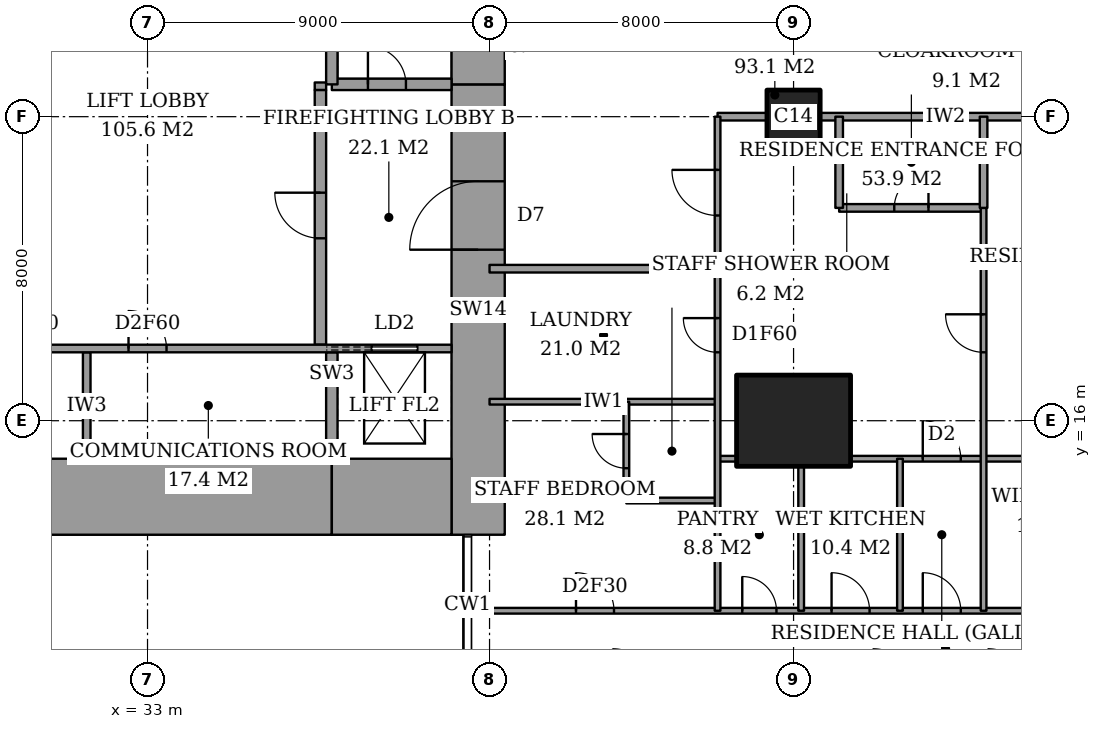
"""IFC4 building model, lengths in metres.
Left out: names, types, materials, properties, quantities, classifications, styles, units other than length and angle.
Written with IfcOpenShell. Run it as: python <this file> out.ifc"""

import sys

from ifc_helpers import new_model, si_unit, direction, frame, frame_2d, origin, origin_2d, place, context, subcontext, project, spatial, rectangle, extrude, element, fill, save


model = new_model("IFC4")
c1 = context("Model", 3, precision=1e-05, world=origin(), true_north=direction((0.0, 1.0)))
c2 = subcontext(c1, "Body", "Model", "MODEL_VIEW")
j1 = project(units=[si_unit("LENGTHUNIT", "METRE"), si_unit("PLANEANGLEUNIT", "RADIAN")], contexts=[c1])
p1 = place(None, origin())
s1 = spatial("IfcSite", under=j1, at=p1, CompositionType="ELEMENT")
p2 = place(p1, origin())
s2 = spatial("IfcBuilding", under=s1, at=p2, CompositionType="ELEMENT")
p3 = place(p2, frame((0.0, 0.0, 282.6)))
s3 = spatial("IfcBuildingStorey", under=s2, at=p3, CompositionType="ELEMENT", Elevation=282.6)
p4 = place(p3, frame((50.0, 16.0, 0.0), z_axis=(0.0, 0.0, 1.0), x_axis=(1.0, 0.0, 0.0)))
e1 = element("IfcColumn", 1, at=p4, inside=s3, PredefinedType="COLUMN", context=c2, shape_type="SweptSolid", body=[
    extrude(rectangle(XDim=3.0, YDim=2.4, at=origin_2d()), origin(), (0.0, 0.0, 1.0), 4.5),
])
p5 = place(p3, frame((50.0, 24.0, 0.0), z_axis=(0.0, 0.0, 1.0), x_axis=(1.0, 0.0, 0.0)))
e2 = element("IfcColumn", 2, at=p5, inside=s3, PredefinedType="COLUMN", context=c2, shape_type="SweptSolid", body=[
    extrude(rectangle(XDim=1.4, YDim=1.4, at=origin_2d()), origin(), (0.0, 0.0, 1.0), 4.5),
])
p6 = place(p3, frame((28.15, 14.0, 0.0), z_axis=(0.0, 0.0, 1.0), x_axis=(1.0, 0.0, 0.0)))
e3 = element("IfcWall", 3, at=p6, inside=s3, PredefinedType="SHEAR", context=c2, shape_type="SweptSolid", body=[
    extrude(rectangle(XDim=9.7, YDim=2.0, at=frame_2d((4.85, 0.0))), origin(), (0.0, 0.0, 1.0), 4.5),
])
p7 = place(p3, frame((37.85, 14.0, 0.0), z_axis=(0.0, 0.0, 1.0), x_axis=(1.0, 0.0, 0.0)))
e4 = element("IfcWall", 4, at=p7, inside=s3, PredefinedType="SHEAR", context=c2, shape_type="SweptSolid", body=[
    extrude(rectangle(XDim=3.15, YDim=2.0, at=frame_2d((1.575, 0.0))), origin(), (0.0, 0.0, 1.0), 4.5),
])
p8 = place(p3, frame((41.7, 13.0, 0.0), z_axis=(0.0, 0.0, 1.0), x_axis=(0.0, 1.0, 0.0)))
e5 = element("IfcWall", 5, at=p8, inside=s3, PredefinedType="SHEAR", context=c2, shape_type="SweptSolid", body=[
    extrude(rectangle(XDim=11.85, YDim=1.4, at=frame_2d((5.925, 0.0))), origin(), (0.0, 0.0, 1.0), 4.5),
])
p9 = place(p8, frame((7.5, 0.0, 0.0)))
e6 = element("IfcOpeningElement", 6, at=p9, cuts=e5, PredefinedType="OPENING", context=c2, shape_type="SweptSolid", body=[
    extrude(rectangle(XDim=1.8, YDim=2.4, at=frame_2d((0.9, 1.2))), frame((0.0, 0.71, 0.0), z_axis=(0.0, -1.0, 0.0), x_axis=(1.0, 0.0, 0.0)), (0.0, 0.0, 1.0), 1.42),
])
p10 = place(p3, frame((41.7, 24.85, 0.0), z_axis=(0.0, 0.0, 1.0), x_axis=(0.0, 1.0, 0.0)))
e7 = element("IfcWall", 7, at=p10, inside=s3, PredefinedType="SHEAR", context=c2, shape_type="SweptSolid", body=[
    extrude(rectangle(XDim=10.15, YDim=1.4, at=frame_2d((5.075, 0.0))), origin(), (0.0, 0.0, 1.0), 4.5),
])
p11 = place(p3, frame((37.85, 24.85, 0.0), z_axis=(0.0, 0.0, 1.0), x_axis=(0.0, 1.0, 0.0)))
e8 = element("IfcWall", 8, at=p11, inside=s3, PredefinedType="SHEAR", context=c2, shape_type="SweptSolid", body=[
    extrude(rectangle(XDim=8.15, YDim=0.3, at=frame_2d((4.075, 0.0))), origin(), (0.0, 0.0, 1.0), 4.5),
])
p12 = place(p3, frame((37.85, 24.85, 0.0), z_axis=(0.0, 0.0, 1.0), x_axis=(1.0, 0.0, 0.0)))
e9 = element("IfcWall", 9, at=p12, inside=s3, PredefinedType="SHEAR", context=c2, shape_type="SweptSolid", body=[
    extrude(rectangle(XDim=3.15, YDim=0.3, at=frame_2d((1.575, 0.0))), origin(), (0.0, 0.0, 1.0), 4.5),
])
p13 = place(p12, frame((0.95, 0.0, 0.0)))
e10 = element("IfcOpeningElement", 10, at=p13, cuts=e9, PredefinedType="OPENING", context=c2, shape_type="SweptSolid", body=[
    extrude(rectangle(XDim=1.0, YDim=2.1, at=frame_2d((0.5, 1.05))), frame((0.0, 0.16, 0.0), z_axis=(0.0, -1.0, 0.0), x_axis=(1.0, 0.0, 0.0)), (0.0, 0.0, 1.0), 0.32),
])
p14 = place(p3, frame((37.55, 18.0, 0.0), z_axis=(0.0, 0.0, 1.0), x_axis=(0.0, 1.0, 0.0)))
e11 = element("IfcWall", 11, at=p14, inside=s3, PredefinedType="PARTITIONING", context=c2, shape_type="SweptSolid", body=[
    extrude(rectangle(XDim=6.7, YDim=0.3, at=frame_2d((3.35, 0.0))), origin(), (0.0, 0.0, 1.0), 4.5),
])
p15 = place(p14, frame((2.8, 0.0, 0.0)))
e12 = element("IfcOpeningElement", 12, at=p15, cuts=e11, PredefinedType="OPENING", context=c2, shape_type="SweptSolid", body=[
    extrude(rectangle(XDim=1.2, YDim=2.1, at=frame_2d((0.6, 1.05))), frame((0.0, 0.16, 0.0), z_axis=(0.0, -1.0, 0.0), x_axis=(1.0, 0.0, 0.0)), (0.0, 0.0, 1.0), 0.32),
])
p16 = place(p3, frame((41.439, 11.0, 0.0), z_axis=(0.0, 0.0, 1.0), x_axis=(1.0, 0.0, 0.0)))
e13 = element("IfcWall", 13, at=p16, inside=s3, PredefinedType="PARTITIONING", context=c2, shape_type="SweptSolid", body=[
    extrude(rectangle(XDim=25.011, YDim=0.15, at=frame_2d((12.505, 0.0))), origin(), (0.0, 0.0, 1.0), 4.25),
])
p17 = place(p16, frame((11.961, 0.0, 0.0)))
e14 = element("IfcOpeningElement", 14, at=p17, cuts=e13, PredefinedType="OPENING", context=c2, shape_type="SweptSolid", body=[
    extrude(rectangle(XDim=1.0, YDim=2.1, at=frame_2d((0.5, 1.05))), frame((0.0, 0.085, 0.0), z_axis=(0.0, -1.0, 0.0), x_axis=(1.0, 0.0, 0.0)), (0.0, 0.0, 1.0), 0.17),
])
p18 = place(p16, frame((20.924, 0.0, 0.0)))
e15 = element("IfcOpeningElement", 15, at=p18, cuts=e13, PredefinedType="OPENING", context=c2, shape_type="SweptSolid", body=[
    extrude(rectangle(XDim=1.0, YDim=2.1, at=frame_2d((0.5, 1.05))), frame((0.0, 0.085, 0.0), z_axis=(0.0, -1.0, 0.0), x_axis=(1.0, 0.0, 0.0)), (0.0, 0.0, 1.0), 0.17),
])
p19 = place(p16, frame((15.249, 0.0, 0.0)))
e16 = element("IfcOpeningElement", 16, at=p19, cuts=e13, PredefinedType="OPENING", context=c2, shape_type="SweptSolid", body=[
    extrude(rectangle(XDim=0.9, YDim=2.1, at=frame_2d((0.45, 1.05))), frame((0.0, 0.085, 0.0), z_axis=(0.0, -1.0, 0.0), x_axis=(1.0, 0.0, 0.0)), (0.0, 0.0, 1.0), 0.17),
])
p20 = place(p16, frame((9.561, 0.0, 0.0)))
e17 = element("IfcOpeningElement", 17, at=p20, cuts=e13, PredefinedType="OPENING", context=c2, shape_type="SweptSolid", body=[
    extrude(rectangle(XDim=1.0, YDim=2.1, at=frame_2d((0.5, 1.05))), frame((0.0, 0.085, 0.0), z_axis=(0.0, -1.0, 0.0), x_axis=(1.0, 0.0, 0.0)), (0.0, 0.0, 1.0), 0.17),
])
p21 = place(p16, frame((7.211, 0.0, 0.0)))
e18 = element("IfcOpeningElement", 18, at=p21, cuts=e13, PredefinedType="OPENING", context=c2, shape_type="SweptSolid", body=[
    extrude(rectangle(XDim=0.9, YDim=2.1, at=frame_2d((0.45, 1.05))), frame((0.0, 0.085, 0.0), z_axis=(0.0, -1.0, 0.0), x_axis=(1.0, 0.0, 0.0)), (0.0, 0.0, 1.0), 0.17),
])
p22 = place(p16, frame((2.836, 0.0, 0.0)))
e19 = element("IfcOpeningElement", 19, at=p22, cuts=e13, PredefinedType="OPENING", context=c2, shape_type="SweptSolid", body=[
    extrude(rectangle(XDim=1.0, YDim=2.1, at=frame_2d((0.5, 1.05))), frame((0.0, 0.085, 0.0), z_axis=(0.0, -1.0, 0.0), x_axis=(1.0, 0.0, 0.0)), (0.0, 0.0, 1.0), 0.17),
])
p23 = place(p3, frame((45.6, 13.9, 0.0), z_axis=(0.0, 0.0, 1.0), x_axis=(1.0, 0.0, 0.0)))
e20 = element("IfcWall", 20, at=p23, inside=s3, PredefinedType="PARTITIONING", context=c2, shape_type="SweptSolid", body=[
    extrude(rectangle(XDim=2.4, YDim=0.15, at=frame_2d((1.2, 0.0))), origin(), (0.0, 0.0, 1.0), 4.25),
])
p24 = place(p3, frame((48.0, 15.0, 0.0), z_axis=(0.0, 0.0, 1.0), x_axis=(1.0, 0.0, 0.0)))
e21 = element("IfcWall", 21, at=p24, inside=s3, PredefinedType="PARTITIONING", context=c2, shape_type="SweptSolid", body=[
    extrude(rectangle(XDim=0.5, YDim=0.15, at=frame_2d((0.25, 0.0))), origin(), (0.0, 0.0, 1.0), 4.25),
])
p25 = place(p3, frame((51.5, 15.0, 0.0), z_axis=(0.0, 0.0, 1.0), x_axis=(1.0, 0.0, 0.0)))
e22 = element("IfcWall", 22, at=p25, inside=s3, PredefinedType="PARTITIONING", context=c2, shape_type="SweptSolid", body=[
    extrude(rectangle(XDim=5.0, YDim=0.15, at=frame_2d((2.5, 0.0))), origin(), (0.0, 0.0, 1.0), 4.25),
])
p26 = place(p25, frame((1.9, 0.0, 0.0)))
e23 = element("IfcOpeningElement", 23, at=p26, cuts=e22, PredefinedType="OPENING", context=c2, shape_type="SweptSolid", body=[
    extrude(rectangle(XDim=1.0, YDim=2.1, at=frame_2d((0.5, 1.05))), frame((0.0, 0.085, 0.0), z_axis=(0.0, -1.0, 0.0), x_axis=(1.0, 0.0, 0.0)), (0.0, 0.0, 1.0), 0.17),
])
p27 = place(p3, frame((42.0, 16.5, 0.0), z_axis=(0.0, 0.0, 1.0), x_axis=(1.0, 0.0, 0.0)))
e24 = element("IfcWall", 24, at=p27, inside=s3, PredefinedType="PARTITIONING", context=c2, shape_type="SweptSolid", body=[
    extrude(rectangle(XDim=6.0, YDim=0.15, at=frame_2d((3.0, 0.0))), origin(), (0.0, 0.0, 1.0), 4.25),
])
p28 = place(p3, frame((42.0, 20.0, 0.0), z_axis=(0.0, 0.0, 1.0), x_axis=(1.0, 0.0, 0.0)))
e25 = element("IfcWall", 25, at=p28, inside=s3, PredefinedType="PARTITIONING", context=c2, shape_type="SweptSolid", body=[
    extrude(rectangle(XDim=6.0, YDim=0.2, at=frame_2d((3.0, 0.0))), origin(), (0.0, 0.0, 1.0), 4.25),
])
p29 = place(p3, frame((51.2, 21.6, 0.0), z_axis=(0.0, 0.0, 1.0), x_axis=(1.0, 0.0, 0.0)))
e26 = element("IfcWall", 26, at=p29, inside=s3, PredefinedType="PARTITIONING", context=c2, shape_type="SweptSolid", body=[
    extrude(rectangle(XDim=3.8, YDim=0.2, at=frame_2d((1.9, 0.0))), origin(), (0.0, 0.0, 1.0), 4.25),
])
p30 = place(p29, frame((1.45, 0.0, 0.0)))
e27 = element("IfcOpeningElement", 27, at=p30, cuts=e26, PredefinedType="OPENING", context=c2, shape_type="SweptSolid", body=[
    extrude(rectangle(XDim=0.9, YDim=2.1, at=frame_2d((0.45, 1.05))), frame((0.0, 0.11, 0.0), z_axis=(0.0, -1.0, 0.0), x_axis=(1.0, 0.0, 0.0)), (0.0, 0.0, 1.0), 0.22),
])
p31 = place(p3, frame((48.0, 24.0, 0.0), z_axis=(0.0, 0.0, 1.0), x_axis=(1.0, 0.0, 0.0)))
e28 = element("IfcWall", 28, at=p31, inside=s3, PredefinedType="PARTITIONING", context=c2, shape_type="SweptSolid", body=[
    extrude(rectangle(XDim=1.3, YDim=0.2, at=frame_2d((0.65, 0.0))), origin(), (0.0, 0.0, 1.0), 4.25),
])
p32 = place(p3, frame((50.7, 24.0, 0.0), z_axis=(0.0, 0.0, 1.0), x_axis=(1.0, 0.0, 0.0)))
e29 = element("IfcWall", 29, at=p32, inside=s3, PredefinedType="PARTITIONING", context=c2, shape_type="SweptSolid", body=[
    extrude(rectangle(XDim=6.6, YDim=0.2, at=frame_2d((3.3, 0.0))), origin(), (0.0, 0.0, 1.0), 4.25),
])
p33 = place(p3, frame((45.6, 13.9, 0.0), z_axis=(0.0, 0.0, 1.0), x_axis=(0.0, 1.0, 0.0)))
e30 = element("IfcWall", 30, at=p33, inside=s3, PredefinedType="PARTITIONING", context=c2, shape_type="SweptSolid", body=[
    extrude(rectangle(XDim=2.6, YDim=0.15, at=frame_2d((1.3, 0.0))), origin(), (0.0, 0.0, 1.0), 4.25),
])
p34 = place(p33, frame((0.85, 0.0, 0.0)))
e31 = element("IfcOpeningElement", 31, at=p34, cuts=e30, PredefinedType="OPENING", context=c2, shape_type="SweptSolid", body=[
    extrude(rectangle(XDim=0.9, YDim=2.1, at=frame_2d((0.45, 1.05))), frame((0.0, 0.085, 0.0), z_axis=(0.0, -1.0, 0.0), x_axis=(1.0, 0.0, 0.0)), (0.0, 0.0, 1.0), 0.17),
])
p35 = place(p3, frame((48.0, 11.0, 0.0), z_axis=(0.0, 0.0, 1.0), x_axis=(0.0, 1.0, 0.0)))
e32 = element("IfcWall", 32, at=p35, inside=s3, PredefinedType="PARTITIONING", context=c2, shape_type="SweptSolid", body=[
    extrude(rectangle(XDim=13.0, YDim=0.15, at=frame_2d((6.5, 0.0))), origin(), (0.0, 0.0, 1.0), 4.25),
])
p36 = place(p35, frame((10.4, 0.0, 0.0)))
e33 = element("IfcOpeningElement", 33, at=p36, cuts=e32, PredefinedType="OPENING", context=c2, shape_type="SweptSolid", body=[
    extrude(rectangle(XDim=1.2, YDim=2.4, at=frame_2d((0.6, 1.2))), frame((0.0, 0.085, 0.0), z_axis=(0.0, -1.0, 0.0), x_axis=(1.0, 0.0, 0.0)), (0.0, 0.0, 1.0), 0.17),
])
p37 = place(p35, frame((6.8, 0.0, 0.0)))
e34 = element("IfcOpeningElement", 34, at=p37, cuts=e32, PredefinedType="OPENING", context=c2, shape_type="SweptSolid", body=[
    extrude(rectangle(XDim=0.9, YDim=2.1, at=frame_2d((0.45, 1.05))), frame((0.0, 0.085, 0.0), z_axis=(0.0, -1.0, 0.0), x_axis=(1.0, 0.0, 0.0)), (0.0, 0.0, 1.0), 0.17),
])
p38 = place(p3, frame((50.2, 11.0, 0.0), z_axis=(0.0, 0.0, 1.0), x_axis=(0.0, 1.0, 0.0)))
e35 = element("IfcWall", 35, at=p38, inside=s3, PredefinedType="PARTITIONING", context=c2, shape_type="SweptSolid", body=[
    extrude(rectangle(XDim=3.8, YDim=0.15, at=frame_2d((1.9, 0.0))), origin(), (0.0, 0.0, 1.0), 4.25),
])
p39 = place(p3, frame((51.2, 21.6, 0.0), z_axis=(0.0, 0.0, 1.0), x_axis=(0.0, 1.0, 0.0)))
e36 = element("IfcWall", 36, at=p39, inside=s3, PredefinedType="PARTITIONING", context=c2, shape_type="SweptSolid", body=[
    extrude(rectangle(XDim=2.4, YDim=0.2, at=frame_2d((1.2, 0.0))), origin(), (0.0, 0.0, 1.0), 4.25),
])
p40 = place(p3, frame((52.8, 11.0, 0.0), z_axis=(0.0, 0.0, 1.0), x_axis=(0.0, 1.0, 0.0)))
e37 = element("IfcWall", 37, at=p40, inside=s3, PredefinedType="PARTITIONING", context=c2, shape_type="SweptSolid", body=[
    extrude(rectangle(XDim=4.0, YDim=0.15, at=frame_2d((2.0, 0.0))), origin(), (0.0, 0.0, 1.0), 4.25),
])
p41 = place(p3, frame((55.0, 21.6, 0.0), z_axis=(0.0, 0.0, 1.0), x_axis=(0.0, 1.0, 0.0)))
e38 = element("IfcWall", 38, at=p41, inside=s3, PredefinedType="PARTITIONING", context=c2, shape_type="SweptSolid", body=[
    extrude(rectangle(XDim=2.4, YDim=0.2, at=frame_2d((1.2, 0.0))), origin(), (0.0, 0.0, 1.0), 4.25),
])
p42 = place(p3, frame((55.0, 11.0, 0.0), z_axis=(0.0, 0.0, 1.0), x_axis=(0.0, 1.0, 0.0)))
e39 = element("IfcWall", 39, at=p42, inside=s3, PredefinedType="PARTITIONING", context=c2, shape_type="SweptSolid", body=[
    extrude(rectangle(XDim=10.6, YDim=0.15, at=frame_2d((5.3, 0.0))), origin(), (0.0, 0.0, 1.0), 4.25),
])
p43 = place(p42, frame((6.8, 0.0, 0.0)))
e40 = element("IfcOpeningElement", 40, at=p43, cuts=e39, PredefinedType="OPENING", context=c2, shape_type="SweptSolid", body=[
    extrude(rectangle(XDim=1.0, YDim=2.1, at=frame_2d((0.5, 1.05))), frame((0.0, 0.085, 0.0), z_axis=(0.0, -1.0, 0.0), x_axis=(1.0, 0.0, 0.0)), (0.0, 0.0, 1.0), 0.17),
])
p44 = place(p3, frame((28.3, 17.9, 0.0), z_axis=(0.0, 0.0, 1.0), x_axis=(1.0, 0.0, 0.0)))
e41 = element("IfcWall", 41, at=p44, inside=s3, PredefinedType="PARTITIONING", context=c2, shape_type="SweptSolid", body=[
    extrude(rectangle(XDim=12.7, YDim=0.2, at=frame_2d((6.35, 0.0))), origin(), (0.0, 0.0, 1.0), 4.5),
])
p45 = place(p44, frame((1.05, 0.0, 0.0)))
e42 = element("IfcOpeningElement", 42, at=p45, cuts=e41, PredefinedType="OPENING", context=c2, shape_type="SweptSolid", body=[
    extrude(rectangle(XDim=0.9, YDim=2.1, at=frame_2d((0.45, 1.05))), frame((0.0, 0.11, 0.0), z_axis=(0.0, -1.0, 0.0), x_axis=(1.0, 0.0, 0.0)), (0.0, 0.0, 1.0), 0.22),
])
p46 = place(p44, frame((4.2, 0.0, 0.0)))
e43 = element("IfcOpeningElement", 43, at=p46, cuts=e41, PredefinedType="OPENING", context=c2, shape_type="SweptSolid", body=[
    extrude(rectangle(XDim=1.0, YDim=2.1, at=frame_2d((0.5, 1.05))), frame((0.0, 0.11, 0.0), z_axis=(0.0, -1.0, 0.0), x_axis=(1.0, 0.0, 0.0)), (0.0, 0.0, 1.0), 0.22),
])
p47 = place(p44, frame((10.6, 0.0, 0.0)))
e44 = element("IfcOpeningElement", 44, at=p47, cuts=e41, PredefinedType="OPENING", context=c2, shape_type="SweptSolid", body=[
    extrude(rectangle(XDim=1.2, YDim=2.1, at=frame_2d((0.6, 1.05))), frame((0.0, 0.11, 0.0), z_axis=(0.0, -1.0, 0.0), x_axis=(1.0, 0.0, 0.0)), (0.0, 0.0, 1.0), 0.22),
])
p48 = place(p3, frame((31.4, 15.0, 0.0), z_axis=(0.0, 0.0, 1.0), x_axis=(0.0, 1.0, 0.0)))
e45 = element("IfcWall", 45, at=p48, inside=s3, PredefinedType="PARTITIONING", context=c2, shape_type="SweptSolid", body=[
    extrude(rectangle(XDim=2.8, YDim=0.2, at=frame_2d((1.4, 0.0))), origin(), (0.0, 0.0, 1.0), 4.5),
])
p49 = place(p3, frame((37.85, 15.0, 0.0), z_axis=(0.0, 0.0, 1.0), x_axis=(0.0, 1.0, 0.0)))
e46 = element("IfcWall", 46, at=p49, inside=s3, PredefinedType="SHEAR", context=c2, shape_type="SweptSolid", body=[
    extrude(rectangle(XDim=2.8, YDim=0.3, at=frame_2d((1.4, 0.0))), origin(), (0.0, 0.0, 1.0), 4.5),
])
p50 = place(p3, frame((37.4, 24.8, 0.0), z_axis=(0.0, 0.0, 1.0), x_axis=(1.0, 0.0, 0.0)))
e47 = element("IfcWall", 47, at=p50, inside=s3, PredefinedType="PARTITIONING", context=c2, shape_type="SweptSolid", body=[
    extrude(rectangle(XDim=0.3, YDim=0.2, at=frame_2d((0.15, 0.0))), origin(), (0.0, 0.0, 1.0), 4.5),
])
p51 = place(p17, origin())
e48 = element("IfcDoor", 48, at=p51, inside=s3, OperationType="SINGLE_SWING_RIGHT", PredefinedType="DOOR", context=c2, shape_type="SweptSolid", body=[
    extrude(rectangle(XDim=1.0, YDim=2.1, at=frame_2d((0.5, 1.05))), frame((0.0, 0.025, 0.0), z_axis=(0.0, -1.0, 0.0), x_axis=(1.0, 0.0, 0.0)), (0.0, 0.0, 1.0), 0.05),
])
fill(e14, e48)
p52 = place(p43, origin())
e49 = element("IfcDoor", 49, at=p52, inside=s3, OperationType="SINGLE_SWING_LEFT", PredefinedType="DOOR", context=c2, shape_type="SweptSolid", body=[
    extrude(rectangle(XDim=1.0, YDim=2.1, at=frame_2d((0.5, 1.05))), frame((0.0, 0.025, 0.0), z_axis=(0.0, -1.0, 0.0), x_axis=(1.0, 0.0, 0.0)), (0.0, 0.0, 1.0), 0.05),
])
fill(e40, e49)
p53 = place(p30, origin())
e50 = element("IfcDoor", 50, at=p53, inside=s3, OperationType="SINGLE_SWING_LEFT", PredefinedType="DOOR", context=c2, shape_type="SweptSolid", body=[
    extrude(rectangle(XDim=0.9, YDim=2.1, at=frame_2d((0.45, 1.05))), frame((0.0, 0.025, 0.0), z_axis=(0.0, -1.0, 0.0), x_axis=(1.0, 0.0, 0.0)), (0.0, 0.0, 1.0), 0.05),
])
fill(e27, e50)
p54 = place(p36, origin())
e51 = element("IfcDoor", 51, at=p54, inside=s3, OperationType="SINGLE_SWING_LEFT", PredefinedType="DOOR", context=c2, shape_type="SweptSolid", body=[
    extrude(rectangle(XDim=1.2, YDim=2.4, at=frame_2d((0.6, 1.2))), frame((0.0, 0.025, 0.0), z_axis=(0.0, -1.0, 0.0), x_axis=(1.0, 0.0, 0.0)), (0.0, 0.0, 1.0), 0.05),
])
fill(e33, e51)
p55 = place(p26, origin())
e52 = element("IfcDoor", 52, at=p55, inside=s3, OperationType="SINGLE_SWING_RIGHT", PredefinedType="DOOR", context=c2, shape_type="SweptSolid", body=[
    extrude(rectangle(XDim=1.0, YDim=2.1, at=frame_2d((0.5, 1.05))), frame((0.0, 0.025, 0.0), z_axis=(0.0, -1.0, 0.0), x_axis=(1.0, 0.0, 0.0)), (0.0, 0.0, 1.0), 0.05),
])
fill(e23, e52)
p56 = place(p20, origin())
e53 = element("IfcDoor", 53, at=p56, inside=s3, OperationType="SINGLE_SWING_RIGHT", PredefinedType="DOOR", context=c2, shape_type="SweptSolid", body=[
    extrude(rectangle(XDim=1.0, YDim=2.1, at=frame_2d((0.5, 1.05))), frame((0.0, 0.025, 0.0), z_axis=(0.0, -1.0, 0.0), x_axis=(1.0, 0.0, 0.0)), (0.0, 0.0, 1.0), 0.05),
])
fill(e17, e53)
p57 = place(p21, origin())
e54 = element("IfcDoor", 54, at=p57, inside=s3, OperationType="SINGLE_SWING_RIGHT", PredefinedType="DOOR", context=c2, shape_type="SweptSolid", body=[
    extrude(rectangle(XDim=0.9, YDim=2.1, at=frame_2d((0.45, 1.05))), frame((0.0, 0.025, 0.0), z_axis=(0.0, -1.0, 0.0), x_axis=(1.0, 0.0, 0.0)), (0.0, 0.0, 1.0), 0.05),
])
fill(e18, e54)
p58 = place(p34, origin())
e55 = element("IfcDoor", 55, at=p58, inside=s3, OperationType="SINGLE_SWING_LEFT", PredefinedType="DOOR", context=c2, shape_type="SweptSolid", body=[
    extrude(rectangle(XDim=0.9, YDim=2.1, at=frame_2d((0.45, 1.05))), frame((0.0, 0.025, 0.0), z_axis=(0.0, -1.0, 0.0), x_axis=(1.0, 0.0, 0.0)), (0.0, 0.0, 1.0), 0.05),
])
fill(e31, e55)
p59 = place(p22, origin())
e56 = element("IfcDoor", 56, at=p59, inside=s3, OperationType="SINGLE_SWING_RIGHT", PredefinedType="DOOR", context=c2, shape_type="SweptSolid", body=[
    extrude(rectangle(XDim=1.0, YDim=2.1, at=frame_2d((0.5, 1.05))), frame((0.0, 0.025, 0.0), z_axis=(0.0, -1.0, 0.0), x_axis=(1.0, 0.0, 0.0)), (0.0, 0.0, 1.0), 0.05),
])
fill(e19, e56)
p60 = place(p37, origin())
e57 = element("IfcDoor", 57, at=p60, inside=s3, OperationType="SINGLE_SWING_LEFT", PredefinedType="DOOR", context=c2, shape_type="SweptSolid", body=[
    extrude(rectangle(XDim=0.9, YDim=2.1, at=frame_2d((0.45, 1.05))), frame((0.0, 0.025, 0.0), z_axis=(0.0, -1.0, 0.0), x_axis=(1.0, 0.0, 0.0)), (0.0, 0.0, 1.0), 0.05),
])
fill(e34, e57)
p61 = place(p13, origin())
e58 = element("IfcDoor", 58, at=p61, inside=s3, OperationType="SINGLE_SWING_RIGHT", PredefinedType="DOOR", context=c2, shape_type="SweptSolid", body=[
    extrude(rectangle(XDim=1.0, YDim=2.1, at=frame_2d((0.5, 1.05))), frame((0.0, 0.025, 0.0), z_axis=(0.0, -1.0, 0.0), x_axis=(1.0, 0.0, 0.0)), (0.0, 0.0, 1.0), 0.05),
])
fill(e10, e58)
p62 = place(p15, origin())
e59 = element("IfcDoor", 59, at=p62, inside=s3, OperationType="SINGLE_SWING_LEFT", PredefinedType="DOOR", context=c2, shape_type="SweptSolid", body=[
    extrude(rectangle(XDim=1.2, YDim=2.1, at=frame_2d((0.6, 1.05))), frame((0.0, 0.025, 0.0), z_axis=(0.0, -1.0, 0.0), x_axis=(1.0, 0.0, 0.0)), (0.0, 0.0, 1.0), 0.05),
])
fill(e12, e59)
p63 = place(p9, origin())
e60 = element("IfcDoor", 60, at=p63, inside=s3, OperationType="DOUBLE_DOOR_DOUBLE_SWING", PredefinedType="DOOR", context=c2, shape_type="SweptSolid", body=[
    extrude(rectangle(XDim=1.8, YDim=2.4, at=frame_2d((0.9, 1.2))), frame((0.0, 0.025, 0.0), z_axis=(0.0, -1.0, 0.0), x_axis=(1.0, 0.0, 0.0)), (0.0, 0.0, 1.0), 0.05),
])
fill(e6, e60)
p64 = place(p46, origin())
e61 = element("IfcDoor", 61, at=p64, inside=s3, OperationType="SINGLE_SWING_RIGHT", PredefinedType="DOOR", context=c2, shape_type="SweptSolid", body=[
    extrude(rectangle(XDim=1.0, YDim=2.1, at=frame_2d((0.5, 1.05))), frame((0.0, 0.025, 0.0), z_axis=(0.0, -1.0, 0.0), x_axis=(1.0, 0.0, 0.0)), (0.0, 0.0, 1.0), 0.05),
])
fill(e43, e61)
p65 = place(p47, origin())
e62 = element("IfcDoor", 62, at=p65, inside=s3, OperationType="SLIDING_TO_LEFT", PredefinedType="DOOR", context=c2, shape_type="SweptSolid", body=[
    extrude(rectangle(XDim=1.2, YDim=2.1, at=frame_2d((0.6, 1.05))), frame((0.0, 0.025, 0.0), z_axis=(0.0, -1.0, 0.0), x_axis=(1.0, 0.0, 0.0)), (0.0, 0.0, 1.0), 0.05),
])
fill(e44, e62)
save(model, sys.argv[1])
